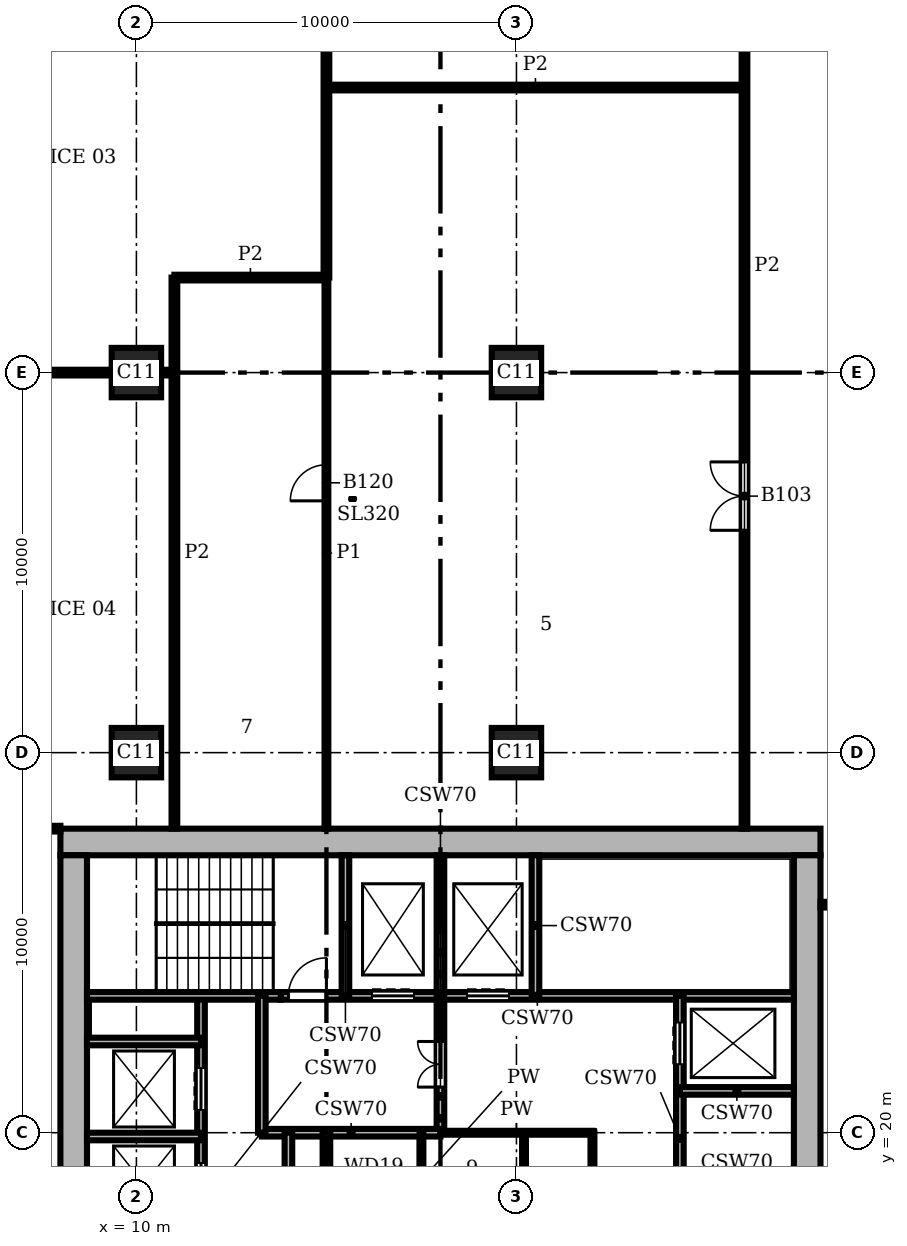
"""IFC4 building model, lengths in metres.
Left out: names, types, materials, properties, quantities, classifications, styles, units other than length and angle.
Written with IfcOpenShell. Run it as: python <this file> out.ifc"""

import sys

from ifc_helpers import new_model, si_unit, direction, frame, frame_2d, origin, origin_2d, place, context, subcontext, project, spatial, rectangle, extrude, element, fill, save


model = new_model("IFC4")
c1 = context("Model", 3, precision=1e-05, world=origin(), true_north=direction((0.0, 1.0)))
c2 = subcontext(c1, "Body", "Model", "MODEL_VIEW")
j1 = project(units=[si_unit("LENGTHUNIT", "METRE"), si_unit("PLANEANGLEUNIT", "RADIAN")], contexts=[c1])
p1 = place(None, origin())
s1 = spatial("IfcSite", under=j1, at=p1, CompositionType="ELEMENT")
p2 = place(p1, origin())
s2 = spatial("IfcBuilding", under=s1, at=p2, CompositionType="ELEMENT")
p3 = place(p2, frame((0.0, 0.0, 131.7)))
s3 = spatial("IfcBuildingStorey", under=s2, at=p3, CompositionType="ELEMENT", Elevation=131.7)
for number, where, z_axis, x_axis in (
    (1, (10.0, 30.0, 0.0), (0.0, 0.0, 1.0), (1.0, 0.0, 0.0)),
    (2, (10.0, 40.0, 0.0), (0.0, 0.0, 1.0), (1.0, 0.0, 0.0)),
    (3, (20.0, 30.0, 0.0), (0.0, 0.0, 1.0), (1.0, 0.0, 0.0)),
    (4, (20.0, 40.0, 0.0), (0.0, 0.0, 1.0), (1.0, 0.0, 0.0)),
):
    element("IfcColumn", number, at=place(p3, frame(where, z_axis=z_axis, x_axis=x_axis)), inside=s3, PredefinedType="COLUMN", context=c2, shape_type="SweptSolid", body=[
        extrude(rectangle(XDim=1.3, YDim=1.3, at=origin_2d()), origin(), (0.0, 0.0, 1.0), 3.9),
    ])
p4 = place(p3, frame((27.65, 8.7, 0.0), z_axis=(0.0, 0.0, 1.0), x_axis=(0.0, 1.0, 0.0)))
e5 = element("IfcWall", 5, at=p4, inside=s3, PredefinedType="SHEAR", context=c2, shape_type="SweptSolid", body=[
    extrude(rectangle(XDim=18.6, YDim=0.7, at=frame_2d((9.3, 0.0))), origin(), (0.0, 0.0, 1.0), 3.9),
])
p5 = place(p4, frame((4.75, 0.0, 0.0)))
e6 = element("IfcOpeningElement", 6, at=p5, cuts=e5, PredefinedType="OPENING", context=c2, shape_type="SweptSolid", body=[
    extrude(rectangle(XDim=1.6, YDim=2.1, at=frame_2d((0.8, 1.05))), frame((0.0, 0.36, 0.0), z_axis=(0.0, -1.0, 0.0), x_axis=(1.0, 0.0, 0.0)), (0.0, 0.0, 1.0), 0.72),
])
p6 = place(p3, frame((28.0, 27.65, 0.0), z_axis=(0.0, 0.0, 1.0), x_axis=(-1.0, 0.0, 0.0)))
e7 = element("IfcWall", 7, at=p6, inside=s3, PredefinedType="SHEAR", context=c2, shape_type="SweptSolid", body=[
    extrude(rectangle(XDim=20.0, YDim=0.7, at=frame_2d((10.0, 0.0))), origin(), (0.0, 0.0, 1.0), 3.9),
])
p7 = place(p3, frame((8.35, 27.3, 0.0), z_axis=(0.0, 0.0, 1.0), x_axis=(0.0, -1.0, 0.0)))
e8 = element("IfcWall", 8, at=p7, inside=s3, PredefinedType="SHEAR", context=c2, shape_type="SweptSolid", body=[
    extrude(rectangle(XDim=18.6, YDim=0.7, at=frame_2d((9.3, 0.0))), origin(), (0.0, 0.0, 1.0), 3.9),
])
p8 = place(p3, frame((8.7, 19.9, 0.0), z_axis=(0.0, 0.0, 1.0), x_axis=(1.0, 0.0, 0.0)))
e9 = element("IfcWall", 9, at=p8, inside=s3, PredefinedType="SHEAR", context=c2, shape_type="SweptSolid", body=[
    extrude(rectangle(XDim=3.0, YDim=0.2, at=frame_2d((1.5, 0.0))), origin(), (0.0, 0.0, 1.0), 3.58),
])
p9 = place(p3, frame((18.0, 20.0, 0.0), z_axis=(0.0, 0.0, 1.0), x_axis=(1.0, 0.0, 0.0)))
e10 = element("IfcWall", 10, at=p9, inside=s3, PredefinedType="PARTITIONING", context=c2, shape_type="SweptSolid", body=[
    extrude(rectangle(XDim=4.0, YDim=0.1, at=frame_2d((2.0, 0.0))), origin(), (0.0, 0.0, 1.0), 3.58),
])
p10 = place(p3, frame((13.3, 20.0, 0.0), z_axis=(0.0, 0.0, 1.0), x_axis=(1.0, 0.0, 0.0)))
e11 = element("IfcWall", 11, at=p10, inside=s3, PredefinedType="SHEAR", context=c2, shape_type="SweptSolid", body=[
    extrude(rectangle(XDim=4.7, YDim=0.2, at=frame_2d((2.35, 0.0))), origin(), (0.0, 0.0, 1.0), 3.58),
])
for number, where, z_axis, x_axis in (
    (12, (24.3, 21.1, 0.0), (0.0, 0.0, 1.0), (1.0, 0.0, 0.0)),
    (13, (8.7, 22.4, 0.0), (0.0, 0.0, 1.0), (1.0, 0.0, 0.0)),
):
    element("IfcWall", number, at=place(p3, frame(where, z_axis=z_axis, x_axis=x_axis)), inside=s3, PredefinedType="SHEAR", context=c2, shape_type="SweptSolid", body=[
        extrude(rectangle(XDim=3.0, YDim=0.2, at=frame_2d((1.5, 0.0))), origin(), (0.0, 0.0, 1.0), 3.58),
    ])
p11 = place(p3, frame((8.7, 23.6, 0.0), z_axis=(0.0, 0.0, 1.0), x_axis=(1.0, 0.0, 0.0)))
e14 = element("IfcWall", 14, at=p11, inside=s3, PredefinedType="SHEAR", context=c2, shape_type="SweptSolid", body=[
    extrude(rectangle(XDim=5.1, YDim=0.2, at=frame_2d((2.55, 0.0))), origin(), (0.0, 0.0, 1.0), 3.58),
])
p12 = place(p3, frame((13.8, 23.6, 0.0), z_axis=(0.0, 0.0, 1.0), x_axis=(1.0, 0.0, 0.0)))
e15 = element("IfcWall", 15, at=p12, inside=s3, PredefinedType="SHEAR", context=c2, shape_type="SweptSolid", body=[
    extrude(rectangle(XDim=13.5, YDim=0.2, at=frame_2d((6.75, 0.0))), origin(), (0.0, 0.0, 1.0), 3.58),
])
p13 = place(p12, frame((2.4, 0.0, 0.0)))
e16 = element("IfcOpeningElement", 16, at=p13, cuts=e15, PredefinedType="OPENING", context=c2, shape_type="SweptSolid", body=[
    extrude(rectangle(XDim=1.1, YDim=2.1, at=frame_2d((0.55, 1.05))), frame((0.0, 0.11, 0.0), z_axis=(0.0, -1.0, 0.0), x_axis=(1.0, 0.0, 0.0)), (0.0, 0.0, 1.0), 0.22),
])
p14 = place(p12, frame((4.9, 0.0, 0.0)))
e17 = element("IfcOpeningElement", 17, at=p14, cuts=e15, PredefinedType="OPENING", context=c2, shape_type="SweptSolid", body=[
    extrude(rectangle(XDim=1.1, YDim=2.1, at=frame_2d((0.55, 1.05))), frame((0.0, 0.11, 0.0), z_axis=(0.0, -1.0, 0.0), x_axis=(1.0, 0.0, 0.0)), (0.0, 0.0, 1.0), 0.22),
])
p15 = place(p12, frame((0.2, 0.0, 0.0)))
e18 = element("IfcOpeningElement", 18, at=p15, cuts=e15, PredefinedType="OPENING", context=c2, shape_type="SweptSolid", body=[
    extrude(rectangle(XDim=1.0, YDim=2.1, at=frame_2d((0.5, 1.05))), frame((0.0, 0.11, 0.0), z_axis=(0.0, -1.0, 0.0), x_axis=(1.0, 0.0, 0.0)), (0.0, 0.0, 1.0), 0.22),
])
p16 = place(p3, frame((11.7, 12.4, 0.0), z_axis=(0.0, 0.0, 1.0), x_axis=(0.0, 1.0, 0.0)))
e19 = element("IfcWall", 19, at=p16, inside=s3, PredefinedType="SHEAR", context=c2, shape_type="SweptSolid", body=[
    extrude(rectangle(XDim=11.2, YDim=0.2, at=frame_2d((5.6, 0.0))), origin(), (0.0, 0.0, 1.0), 3.58),
])
p17 = place(p16, frame((0.7, 0.0, 0.0)))
e20 = element("IfcOpeningElement", 20, at=p17, cuts=e19, PredefinedType="OPENING", context=c2, shape_type="SweptSolid", body=[
    extrude(rectangle(XDim=1.1, YDim=2.1, at=frame_2d((0.55, 1.05))), frame((0.0, 0.11, 0.0), z_axis=(0.0, -1.0, 0.0), x_axis=(1.0, 0.0, 0.0)), (0.0, 0.0, 1.0), 0.22),
])
p18 = place(p16, frame((3.2, 0.0, 0.0)))
e21 = element("IfcOpeningElement", 21, at=p18, cuts=e19, PredefinedType="OPENING", context=c2, shape_type="SweptSolid", body=[
    extrude(rectangle(XDim=1.1, YDim=2.1, at=frame_2d((0.55, 1.05))), frame((0.0, 0.11, 0.0), z_axis=(0.0, -1.0, 0.0), x_axis=(1.0, 0.0, 0.0)), (0.0, 0.0, 1.0), 0.22),
])
p19 = place(p16, frame((5.7, 0.0, 0.0)))
e22 = element("IfcOpeningElement", 22, at=p19, cuts=e19, PredefinedType="OPENING", context=c2, shape_type="SweptSolid", body=[
    extrude(rectangle(XDim=1.1, YDim=2.1, at=frame_2d((0.55, 1.05))), frame((0.0, 0.11, 0.0), z_axis=(0.0, -1.0, 0.0), x_axis=(1.0, 0.0, 0.0)), (0.0, 0.0, 1.0), 0.22),
])
p20 = place(p16, frame((8.2, 0.0, 0.0)))
e23 = element("IfcOpeningElement", 23, at=p20, cuts=e19, PredefinedType="OPENING", context=c2, shape_type="SweptSolid", body=[
    extrude(rectangle(XDim=1.1, YDim=2.1, at=frame_2d((0.55, 1.05))), frame((0.0, 0.11, 0.0), z_axis=(0.0, -1.0, 0.0), x_axis=(1.0, 0.0, 0.0)), (0.0, 0.0, 1.0), 0.22),
])
p21 = place(p3, frame((13.3, 20.0, 0.0), z_axis=(0.0, 0.0, 1.0), x_axis=(0.0, 1.0, 0.0)))
e24 = element("IfcWall", 24, at=p21, inside=s3, PredefinedType="SHEAR", context=c2, shape_type="SweptSolid", body=[
    extrude(rectangle(XDim=3.6, YDim=0.2, at=frame_2d((1.8, 0.0))), origin(), (0.0, 0.0, 1.0), 3.58),
])
for number, where, z_axis, x_axis in (
    (25, (14.0, 17.5, 0.0), (0.0, 0.0, 1.0), (0.0, 1.0, 0.0)),
    (26, (15.0, 17.5, 0.0), (0.0, 0.0, 1.0), (0.0, 1.0, 0.0)),
):
    element("IfcWall", number, at=place(p3, frame(where, z_axis=z_axis, x_axis=x_axis)), inside=s3, PredefinedType="SHEAR", context=c2, shape_type="SweptSolid", body=[
        extrude(rectangle(XDim=2.5, YDim=0.2, at=frame_2d((1.25, 0.0))), origin(), (0.0, 0.0, 1.0), 3.58),
    ])
p22 = place(p3, frame((15.5, 23.6, 0.0), z_axis=(0.0, 0.0, 1.0), x_axis=(0.0, 1.0, 0.0)))
e27 = element("IfcWall", 27, at=p22, inside=s3, PredefinedType="SHEAR", context=c2, shape_type="SweptSolid", body=[
    extrude(rectangle(XDim=3.7, YDim=0.2, at=frame_2d((1.85, 0.0))), origin(), (0.0, 0.0, 1.0), 3.58),
])
p23 = place(p3, frame((17.5, 17.5, 0.0), z_axis=(0.0, 0.0, 1.0), x_axis=(0.0, 1.0, 0.0)))
e28 = element("IfcWall", 28, at=p23, inside=s3, PredefinedType="PARTITIONING", context=c2, shape_type="SweptSolid", body=[
    extrude(rectangle(XDim=2.5, YDim=0.1, at=frame_2d((1.25, 0.0))), origin(), (0.0, 0.0, 1.0), 3.58),
])
p24 = place(p3, frame((18.0, 20.0, 0.0), z_axis=(0.0, 0.0, 1.0), x_axis=(0.0, 1.0, 0.0)))
e29 = element("IfcWall", 29, at=p24, inside=s3, PredefinedType="SHEAR", context=c2, shape_type="SweptSolid", body=[
    extrude(rectangle(XDim=7.3, YDim=0.2, at=frame_2d((3.65, 0.0))), origin(), (0.0, 0.0, 1.0), 3.58),
])
p25 = place(p24, frame((1.2, 0.0, 0.0)))
e30 = element("IfcOpeningElement", 30, at=p25, cuts=e29, PredefinedType="OPENING", context=c2, shape_type="SweptSolid", body=[
    extrude(rectangle(XDim=1.2, YDim=2.1, at=frame_2d((0.6, 1.05))), frame((0.0, 0.11, 0.0), z_axis=(0.0, -1.0, 0.0), x_axis=(1.0, 0.0, 0.0)), (0.0, 0.0, 1.0), 0.22),
])
p26 = place(p3, frame((20.2, 17.5, 0.0), z_axis=(0.0, 0.0, 1.0), x_axis=(0.0, 1.0, 0.0)))
e31 = element("IfcWall", 31, at=p26, inside=s3, PredefinedType="PARTITIONING", context=c2, shape_type="SweptSolid", body=[
    extrude(rectangle(XDim=2.5, YDim=0.1, at=frame_2d((1.25, 0.0))), origin(), (0.0, 0.0, 1.0), 3.58),
])
p27 = place(p3, frame((20.5, 23.6, 0.0), z_axis=(0.0, 0.0, 1.0), x_axis=(0.0, 1.0, 0.0)))
e32 = element("IfcWall", 32, at=p27, inside=s3, PredefinedType="SHEAR", context=c2, shape_type="SweptSolid", body=[
    extrude(rectangle(XDim=3.7, YDim=0.2, at=frame_2d((1.85, 0.0))), origin(), (0.0, 0.0, 1.0), 3.58),
])
p28 = place(p3, frame((22.0, 16.2, 0.0), z_axis=(0.0, 0.0, 1.0), x_axis=(0.0, 1.0, 0.0)))
e33 = element("IfcWall", 33, at=p28, inside=s3, PredefinedType="PARTITIONING", context=c2, shape_type="SweptSolid", body=[
    extrude(rectangle(XDim=3.8, YDim=0.1, at=frame_2d((1.9, 0.0))), origin(), (0.0, 0.0, 1.0), 3.58),
])
p29 = place(p28, frame((0.1, 0.0, 0.0)))
e34 = element("IfcOpeningElement", 34, at=p29, cuts=e33, PredefinedType="OPENING", context=c2, shape_type="SweptSolid", body=[
    extrude(rectangle(XDim=1.1, YDim=2.1, at=frame_2d((0.55, 1.05))), frame((0.0, 0.06, 0.0), z_axis=(0.0, -1.0, 0.0), x_axis=(1.0, 0.0, 0.0)), (0.0, 0.0, 1.0), 0.12),
])
p30 = place(p3, frame((24.3, 16.1, 0.0), z_axis=(0.0, 0.0, 1.0), x_axis=(0.0, 1.0, 0.0)))
e35 = element("IfcWall", 35, at=p30, inside=s3, PredefinedType="SHEAR", context=c2, shape_type="SweptSolid", body=[
    extrude(rectangle(XDim=7.5, YDim=0.2, at=frame_2d((3.75, 0.0))), origin(), (0.0, 0.0, 1.0), 3.58),
])
p31 = place(p30, frame((5.7, 0.0, 0.0)))
e36 = element("IfcOpeningElement", 36, at=p31, cuts=e35, PredefinedType="OPENING", context=c2, shape_type="SweptSolid", body=[
    extrude(rectangle(XDim=1.1, YDim=2.1, at=frame_2d((0.55, 1.05))), frame((0.0, 0.11, 0.0), z_axis=(0.0, -1.0, 0.0), x_axis=(1.0, 0.0, 0.0)), (0.0, 0.0, 1.0), 0.22),
])
p32 = place(p3, frame((15.0, 28.0, 0.0), z_axis=(0.0, 0.0, 1.0), x_axis=(0.0, 1.0, 0.0)))
e37 = element("IfcWall", 37, at=p32, inside=s3, PredefinedType="PARTITIONING", context=c2, shape_type="SweptSolid", body=[
    extrude(rectangle(XDim=14.5, YDim=0.1, at=frame_2d((7.25, 0.0))), origin(), (0.0, 0.0, 1.0), 3.58),
])
p33 = place(p32, frame((8.625, 0.0, 0.0)))
e38 = element("IfcOpeningElement", 38, at=p33, cuts=e37, PredefinedType="OPENING", context=c2, shape_type="SweptSolid", body=[
    extrude(rectangle(XDim=0.95, YDim=2.1, at=frame_2d((0.475, 1.05))), frame((0.0, 0.06, 0.0), z_axis=(0.0, -1.0, 0.0), x_axis=(1.0, 0.0, 0.0)), (0.0, 0.0, 1.0), 0.12),
])
p34 = place(p3, frame((11.0, 28.0, 0.0), z_axis=(0.0, 0.0, 1.0), x_axis=(0.0, 1.0, 0.0)))
e39 = element("IfcWall", 39, at=p34, inside=s3, PredefinedType="PARTITIONING", context=c2, shape_type="SweptSolid", body=[
    extrude(rectangle(XDim=14.5, YDim=0.15, at=frame_2d((7.25, 0.0))), origin(), (0.0, 0.0, 1.0), 3.58),
])
p35 = place(p3, frame((15.0, 42.5, 0.0), z_axis=(0.0, 0.0, 1.0), x_axis=(0.0, 1.0, 0.0)))
e40 = element("IfcWall", 40, at=p35, inside=s3, PredefinedType="PARTITIONING", context=c2, shape_type="SweptSolid", body=[
    extrude(rectangle(XDim=15.1, YDim=0.15, at=frame_2d((7.55, 0.0))), origin(), (0.0, 0.0, 1.0), 3.58),
])
p36 = place(p3, frame((26.0, 28.0, 0.0), z_axis=(0.0, 0.0, 1.0), x_axis=(0.0, 1.0, 0.0)))
e41 = element("IfcWall", 41, at=p36, inside=s3, PredefinedType="PARTITIONING", context=c2, shape_type="SweptSolid", body=[
    extrude(rectangle(XDim=29.6, YDim=0.15, at=frame_2d((14.8, 0.0))), origin(), (0.0, 0.0, 1.0), 3.58),
])
p37 = place(p36, frame((7.85, 0.0, 0.0)))
e42 = element("IfcOpeningElement", 42, at=p37, cuts=e41, PredefinedType="OPENING", context=c2, shape_type="SweptSolid", body=[
    extrude(rectangle(XDim=1.8, YDim=2.1, at=frame_2d((0.9, 1.05))), frame((0.0, 0.085, 0.0), z_axis=(0.0, -1.0, 0.0), x_axis=(1.0, 0.0, 0.0)), (0.0, 0.0, 1.0), 0.17),
])
p38 = place(p3, frame((28.0, 26.0, 0.0), z_axis=(0.0, 0.0, 1.0), x_axis=(1.0, 0.0, 0.0)))
e43 = element("IfcWall", 43, at=p38, inside=s3, PredefinedType="PARTITIONING", context=c2, shape_type="SweptSolid", body=[
    extrude(rectangle(XDim=2.8, YDim=0.15, at=frame_2d((1.4, 0.0))), origin(), (0.0, 0.0, 1.0), 3.58),
])
p39 = place(p3, frame((5.6, 28.0, 0.0), z_axis=(0.0, 0.0, 1.0), x_axis=(1.0, 0.0, 0.0)))
e44 = element("IfcWall", 44, at=p39, inside=s3, PredefinedType="PARTITIONING", context=c2, shape_type="SweptSolid", body=[
    extrude(rectangle(XDim=2.4, YDim=0.15, at=frame_2d((1.2, 0.0))), origin(), (0.0, 0.0, 1.0), 3.58),
])
p40 = place(p3, frame((0.45, 40.0, 0.0), z_axis=(0.0, 0.0, 1.0), x_axis=(1.0, 0.0, 0.0)))
e45 = element("IfcWall", 45, at=p40, inside=s3, PredefinedType="PARTITIONING", context=c2, shape_type="SweptSolid", body=[
    extrude(rectangle(XDim=8.9, YDim=0.15, at=frame_2d((4.45, 0.0))), origin(), (0.0, 0.0, 1.0), 3.58),
])
p41 = place(p3, frame((10.65, 40.0, 0.0), z_axis=(0.0, 0.0, 1.0), x_axis=(1.0, 0.0, 0.0)))
e46 = element("IfcWall", 46, at=p41, inside=s3, PredefinedType="PARTITIONING", context=c2, shape_type="SweptSolid", body=[
    extrude(rectangle(XDim=0.35, YDim=0.15, at=frame_2d((0.175, 0.0))), origin(), (0.0, 0.0, 1.0), 3.58),
])
p42 = place(p3, frame((11.0, 42.5, 0.0), z_axis=(0.0, 0.0, 1.0), x_axis=(1.0, 0.0, 0.0)))
e47 = element("IfcWall", 47, at=p42, inside=s3, PredefinedType="PARTITIONING", context=c2, shape_type="SweptSolid", body=[
    extrude(rectangle(XDim=4.0, YDim=0.15, at=frame_2d((2.0, 0.0))), origin(), (0.0, 0.0, 1.0), 3.58),
])
p43 = place(p3, frame((15.0, 47.5, 0.0), z_axis=(0.0, 0.0, 1.0), x_axis=(1.0, 0.0, 0.0)))
e48 = element("IfcWall", 48, at=p43, inside=s3, PredefinedType="PARTITIONING", context=c2, shape_type="SweptSolid", body=[
    extrude(rectangle(XDim=11.0, YDim=0.15, at=frame_2d((5.5, 0.0))), origin(), (0.0, 0.0, 1.0), 3.58),
])
p44 = place(p19, origin())
e49 = element("IfcDoor", 49, at=p44, inside=s3, OperationType="DOUBLE_DOOR_SLIDING", PredefinedType="DOOR", context=c2, shape_type="SweptSolid", body=[
    extrude(rectangle(XDim=1.1, YDim=2.1, at=frame_2d((0.55, 1.05))), frame((0.0, 0.025, 0.0), z_axis=(0.0, -1.0, 0.0), x_axis=(1.0, 0.0, 0.0)), (0.0, 0.0, 1.0), 0.05),
])
fill(e22, e49)
p45 = place(p20, origin())
e50 = element("IfcDoor", 50, at=p45, inside=s3, OperationType="DOUBLE_DOOR_SLIDING", PredefinedType="DOOR", context=c2, shape_type="SweptSolid", body=[
    extrude(rectangle(XDim=1.1, YDim=2.1, at=frame_2d((0.55, 1.05))), frame((0.0, 0.025, 0.0), z_axis=(0.0, -1.0, 0.0), x_axis=(1.0, 0.0, 0.0)), (0.0, 0.0, 1.0), 0.05),
])
fill(e23, e50)
p46 = place(p31, origin())
e51 = element("IfcDoor", 51, at=p46, inside=s3, OperationType="DOUBLE_DOOR_SLIDING", PredefinedType="DOOR", context=c2, shape_type="SweptSolid", body=[
    extrude(rectangle(XDim=1.1, YDim=2.1, at=frame_2d((0.55, 1.05))), frame((0.0, 0.025, 0.0), z_axis=(0.0, -1.0, 0.0), x_axis=(1.0, 0.0, 0.0)), (0.0, 0.0, 1.0), 0.05),
])
fill(e36, e51)
p47 = place(p13, origin())
e52 = element("IfcDoor", 52, at=p47, inside=s3, OperationType="DOUBLE_DOOR_SLIDING", PredefinedType="DOOR", context=c2, shape_type="SweptSolid", body=[
    extrude(rectangle(XDim=1.1, YDim=2.1, at=frame_2d((0.55, 1.05))), frame((0.0, 0.025, 0.0), z_axis=(0.0, -1.0, 0.0), x_axis=(1.0, 0.0, 0.0)), (0.0, 0.0, 1.0), 0.05),
])
fill(e16, e52)
p48 = place(p14, origin())
e53 = element("IfcDoor", 53, at=p48, inside=s3, OperationType="DOUBLE_DOOR_SLIDING", PredefinedType="DOOR", context=c2, shape_type="SweptSolid", body=[
    extrude(rectangle(XDim=1.1, YDim=2.1, at=frame_2d((0.55, 1.05))), frame((0.0, 0.025, 0.0), z_axis=(0.0, -1.0, 0.0), x_axis=(1.0, 0.0, 0.0)), (0.0, 0.0, 1.0), 0.05),
])
fill(e17, e53)
p49 = place(p15, origin())
e54 = element("IfcDoor", 54, at=p49, inside=s3, OperationType="SINGLE_SWING_RIGHT", PredefinedType="DOOR", context=c2, shape_type="SweptSolid", body=[
    extrude(rectangle(XDim=1.0, YDim=2.1, at=frame_2d((0.5, 1.05))), frame((0.0, 0.025, 0.0), z_axis=(0.0, -1.0, 0.0), x_axis=(1.0, 0.0, 0.0)), (0.0, 0.0, 1.0), 0.05),
])
fill(e18, e54)
p50 = place(p25, origin())
e55 = element("IfcDoor", 55, at=p50, inside=s3, OperationType="DOUBLE_DOOR_SINGLE_SWING", PredefinedType="DOOR", context=c2, shape_type="SweptSolid", body=[
    extrude(rectangle(XDim=1.2, YDim=2.1, at=frame_2d((0.6, 1.05))), frame((0.0, 0.025, 0.0), z_axis=(0.0, -1.0, 0.0), x_axis=(1.0, 0.0, 0.0)), (0.0, 0.0, 1.0), 0.05),
])
fill(e30, e55)
p51 = place(p37, origin())
e56 = element("IfcDoor", 56, at=p51, inside=s3, OperationType="DOUBLE_DOOR_SINGLE_SWING", PredefinedType="DOOR", context=c2, shape_type="SweptSolid", body=[
    extrude(rectangle(XDim=1.8, YDim=2.1, at=frame_2d((0.9, 1.05))), frame((0.0, 0.025, 0.0), z_axis=(0.0, -1.0, 0.0), x_axis=(1.0, 0.0, 0.0)), (0.0, 0.0, 1.0), 0.05),
])
fill(e42, e56)
p52 = place(p33, origin())
e57 = element("IfcDoor", 57, at=p52, inside=s3, OperationType="SINGLE_SWING_LEFT", PredefinedType="DOOR", context=c2, shape_type="SweptSolid", body=[
    extrude(rectangle(XDim=0.95, YDim=2.1, at=frame_2d((0.475, 1.05))), frame((0.0, 0.025, 0.0), z_axis=(0.0, -1.0, 0.0), x_axis=(1.0, 0.0, 0.0)), (0.0, 0.0, 1.0), 0.05),
])
fill(e38, e57)
save(model, sys.argv[1])
